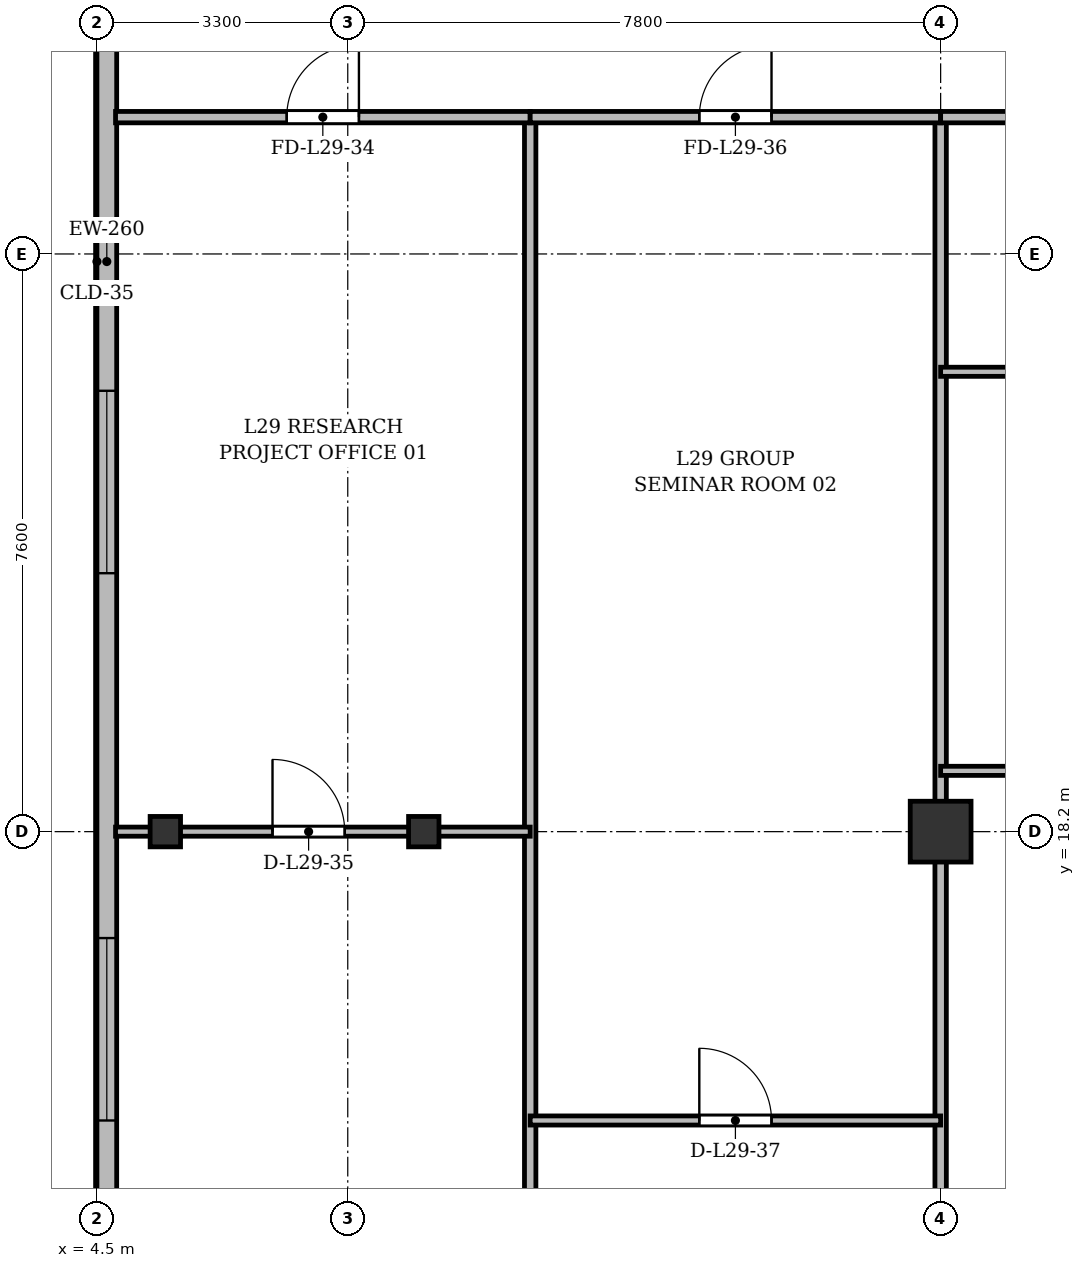
"""IFC4 building model, lengths in metres.
Left out: names, types, materials, properties, quantities, classifications, styles, units other than length and angle.
Written with IfcOpenShell. Run it as: python <this file> out.ifc"""

import sys

from ifc_helpers import new_model, si_unit, direction, frame, frame_2d, origin, origin_2d, place, context, subcontext, project, spatial, rectangle, i_section, extrude, source, transform, mapped, element, fill, save


model = new_model("IFC4")
c1 = context("Model", 3, precision=1e-05, world=origin(), true_north=direction((0.0, 1.0)))
c2 = subcontext(c1, "Body", "Model", "MODEL_VIEW")
j1 = project(units=[si_unit("LENGTHUNIT", "METRE"), si_unit("PLANEANGLEUNIT", "RADIAN")], contexts=[c1])
p1 = place(None, origin())
s1 = spatial("IfcSite", under=j1, at=p1, CompositionType="ELEMENT")
p2 = place(p1, origin())
s2 = spatial("IfcBuilding", under=s1, at=p2, CompositionType="ELEMENT")
p3 = place(p2, frame((0.0, 0.0, 114.1)))
s3 = spatial("IfcBuildingStorey", under=s2, at=p3, CompositionType="ELEMENT", Elevation=114.1)
m1 = source(origin(), c2, "Body", "SweptSolid", [
    extrude(i_section(OverallWidth=0.4, OverallDepth=0.4, WebThickness=0.022, FlangeThickness=0.035, at=origin_2d()), origin(), (0.0, 0.0, 1.0), 3.6),
])
for number, where, z_axis, x_axis in (
    (1, (5.4, 18.2, 0.0), (0.0, 0.0, 1.0), (1.0, 0.0, 0.0)),
    (2, (8.8, 18.2, 0.0), (0.0, 0.0, 1.0), (1.0, 0.0, 0.0)),
):
    element("IfcColumn", number, at=place(p3, frame(where, z_axis=z_axis, x_axis=x_axis)), inside=s3, PredefinedType="COLUMN", context=c2, shape_type="MappedRepresentation", body=[
        mapped(m1, transform((0.0, 0.0, 0.0), x_axis=(1.0, 0.0, 0.0), y_axis=(0.0, 1.0, 0.0), z_axis=(0.0, 0.0, 1.0), scale=1.0)),
    ])
m2 = source(origin(), c2, "Body", "SweptSolid", [
    extrude(rectangle(XDim=0.8, YDim=0.8, at=origin_2d()), origin(), (0.0, 0.0, 1.0), 3.6),
])
p4 = place(p3, frame((15.6, 18.2, 0.0), z_axis=(0.0, 0.0, 1.0), x_axis=(1.0, 0.0, 0.0)))
e3 = element("IfcColumn", 3, at=p4, inside=s3, PredefinedType="COLUMN", context=c2, shape_type="MappedRepresentation", body=[
    mapped(m2, transform((0.0, 0.0, 0.0), x_axis=(1.0, 0.0, 0.0), y_axis=(0.0, 1.0, 0.0), z_axis=(0.0, 0.0, 1.0), scale=1.0)),
])
p5 = place(p3, frame((4.63, 5.9, 0.0), z_axis=(0.0, 0.0, 1.0), x_axis=(0.0, 1.0, 0.0)))
e4 = element("IfcWall", 4, at=p5, inside=s3, PredefinedType="SOLIDWALL", context=c2, shape_type="SweptSolid", body=[
    extrude(rectangle(XDim=39.6, YDim=0.26, at=frame_2d((19.8, 0.0))), origin(), (0.0, 0.0, 1.0), 3.34),
])
p6 = place(p5, frame((1.45, 0.0, 0.92)))
e5 = element("IfcOpeningElement", 5, at=p6, cuts=e4, PredefinedType="OPENING", context=c2, shape_type="SweptSolid", body=[
    extrude(rectangle(XDim=1.2, YDim=1.65, at=frame_2d((0.6, 0.825))), frame((0.0, 0.14, 0.0), z_axis=(0.0, -1.0, 0.0), x_axis=(1.0, 0.0, 0.0)), (0.0, 0.0, 1.0), 0.28),
])
p7 = place(p5, frame((4.3, 0.0, 0.92)))
e6 = element("IfcOpeningElement", 6, at=p7, cuts=e4, PredefinedType="OPENING", context=c2, shape_type="SweptSolid", body=[
    extrude(rectangle(XDim=2.4, YDim=2.1, at=frame_2d((1.2, 1.05))), frame((0.0, 0.14, 0.0), z_axis=(0.0, -1.0, 0.0), x_axis=(1.0, 0.0, 0.0)), (0.0, 0.0, 1.0), 0.28),
])
p8 = place(p5, frame((8.5, 0.0, 0.92)))
e7 = element("IfcOpeningElement", 7, at=p8, cuts=e4, PredefinedType="OPENING", context=c2, shape_type="SweptSolid", body=[
    extrude(rectangle(XDim=2.4, YDim=2.1, at=frame_2d((1.2, 1.05))), frame((0.0, 0.14, 0.0), z_axis=(0.0, -1.0, 0.0), x_axis=(1.0, 0.0, 0.0)), (0.0, 0.0, 1.0), 0.28),
])
p9 = place(p5, frame((15.7, 0.0, 0.92)))
e8 = element("IfcOpeningElement", 8, at=p9, cuts=e4, PredefinedType="OPENING", context=c2, shape_type="SweptSolid", body=[
    extrude(rectangle(XDim=2.4, YDim=2.1, at=frame_2d((1.2, 1.05))), frame((0.0, 0.14, 0.0), z_axis=(0.0, -1.0, 0.0), x_axis=(1.0, 0.0, 0.0)), (0.0, 0.0, 1.0), 0.28),
])
p10 = place(p5, frame((33.9, 0.0, 0.92)))
e9 = element("IfcOpeningElement", 9, at=p10, cuts=e4, PredefinedType="OPENING", context=c2, shape_type="SweptSolid", body=[
    extrude(rectangle(XDim=1.2, YDim=1.65, at=frame_2d((0.6, 0.825))), frame((0.0, 0.14, 0.0), z_axis=(0.0, -1.0, 0.0), x_axis=(1.0, 0.0, 0.0)), (0.0, 0.0, 1.0), 0.28),
])
p11 = place(p5, frame((37.25, 0.0, 0.92)))
e10 = element("IfcOpeningElement", 10, at=p11, cuts=e4, PredefinedType="OPENING", context=c2, shape_type="SweptSolid", body=[
    extrude(rectangle(XDim=1.2, YDim=1.65, at=frame_2d((0.6, 0.825))), frame((0.0, 0.14, 0.0), z_axis=(0.0, -1.0, 0.0), x_axis=(1.0, 0.0, 0.0)), (0.0, 0.0, 1.0), 0.28),
])
p12 = place(p3, frame((10.2, 3.145, 0.0), z_axis=(0.0, 0.0, 1.0), x_axis=(0.0, 1.0, 0.0)))
e11 = element("IfcWall", 11, at=p12, inside=s3, PredefinedType="PARTITIONING", context=c2, shape_type="SweptSolid", body=[
    extrude(rectangle(XDim=24.455, YDim=0.15, at=frame_2d((12.228, 0.0))), origin(), (0.0, 0.0, 1.0), 2.752),
])
p13 = place(p3, frame((15.6, 3.145, 0.0), z_axis=(0.0, 0.0, 1.0), x_axis=(0.0, 1.0, 0.0)))
e12 = element("IfcWall", 12, at=p13, inside=s3, PredefinedType="PARTITIONING", context=c2, shape_type="SweptSolid", body=[
    extrude(rectangle(XDim=24.455, YDim=0.15, at=frame_2d((12.228, 0.0))), origin(), (0.0, 0.0, 1.0), 2.84),
])
p14 = place(p3, frame((4.745, 27.6, 0.0), z_axis=(0.0, 0.0, 1.0), x_axis=(1.0, 0.0, 0.0)))
e13 = element("IfcWall", 13, at=p14, inside=s3, PredefinedType="PARTITIONING", context=c2, shape_type="SweptSolid", body=[
    extrude(rectangle(XDim=5.455, YDim=0.15, at=frame_2d((2.728, 0.0))), origin(), (0.0, 0.0, 1.0), 2.84),
])
p15 = place(p14, frame((2.252, 0.0, 0.0)))
e14 = element("IfcOpeningElement", 14, at=p15, cuts=e13, PredefinedType="OPENING", context=c2, shape_type="SweptSolid", body=[
    extrude(rectangle(XDim=0.95, YDim=2.15, at=frame_2d((0.475, 1.075))), frame((0.0, 0.085, 0.0), z_axis=(0.0, -1.0, 0.0), x_axis=(1.0, 0.0, 0.0)), (0.0, 0.0, 1.0), 0.17),
])
p16 = place(p3, frame((4.745, 18.2, 0.0), z_axis=(0.0, 0.0, 1.0), x_axis=(1.0, 0.0, 0.0)))
e15 = element("IfcWall", 15, at=p16, inside=s3, PredefinedType="PARTITIONING", context=c2, shape_type="SweptSolid", body=[
    extrude(rectangle(XDim=5.455, YDim=0.12, at=frame_2d((2.728, 0.0))), origin(), (0.0, 0.0, 1.0), 2.752),
])
p17 = place(p16, frame((2.065, 0.0, 0.0)))
e16 = element("IfcOpeningElement", 16, at=p17, cuts=e15, PredefinedType="OPENING", context=c2, shape_type="SweptSolid", body=[
    extrude(rectangle(XDim=0.95, YDim=2.15, at=frame_2d((0.475, 1.075))), frame((0.0, 0.07, 0.0), z_axis=(0.0, -1.0, 0.0), x_axis=(1.0, 0.0, 0.0)), (0.0, 0.0, 1.0), 0.14),
])
p18 = place(p3, frame((10.2, 27.6, 0.0), z_axis=(0.0, 0.0, 1.0), x_axis=(1.0, 0.0, 0.0)))
e17 = element("IfcWall", 17, at=p18, inside=s3, PredefinedType="PARTITIONING", context=c2, shape_type="SweptSolid", body=[
    extrude(rectangle(XDim=5.4, YDim=0.15, at=frame_2d((2.7, 0.0))), origin(), (0.0, 0.0, 1.0), 2.84),
])
p19 = place(p18, frame((2.225, 0.0, 0.0)))
e18 = element("IfcOpeningElement", 18, at=p19, cuts=e17, PredefinedType="OPENING", context=c2, shape_type="SweptSolid", body=[
    extrude(rectangle(XDim=0.95, YDim=2.15, at=frame_2d((0.475, 1.075))), frame((0.0, 0.085, 0.0), z_axis=(0.0, -1.0, 0.0), x_axis=(1.0, 0.0, 0.0)), (0.0, 0.0, 1.0), 0.17),
])
p20 = place(p3, frame((10.2, 14.4, 0.0), z_axis=(0.0, 0.0, 1.0), x_axis=(1.0, 0.0, 0.0)))
e19 = element("IfcWall", 19, at=p20, inside=s3, PredefinedType="PARTITIONING", context=c2, shape_type="SweptSolid", body=[
    extrude(rectangle(XDim=5.4, YDim=0.12, at=frame_2d((2.7, 0.0))), origin(), (0.0, 0.0, 1.0), 2.84),
])
p21 = place(p20, frame((2.225, 0.0, 0.0)))
e20 = element("IfcOpeningElement", 20, at=p21, cuts=e19, PredefinedType="OPENING", context=c2, shape_type="SweptSolid", body=[
    extrude(rectangle(XDim=0.95, YDim=2.15, at=frame_2d((0.475, 1.075))), frame((0.0, 0.07, 0.0), z_axis=(0.0, -1.0, 0.0), x_axis=(1.0, 0.0, 0.0)), (0.0, 0.0, 1.0), 0.14),
])
p22 = place(p3, frame((15.6, 19.0, 0.0), z_axis=(0.0, 0.0, 1.0), x_axis=(1.0, 0.0, 0.0)))
e21 = element("IfcWall", 21, at=p22, inside=s3, PredefinedType="PARTITIONING", context=c2, shape_type="SweptSolid", body=[
    extrude(rectangle(XDim=6.2, YDim=0.12, at=frame_2d((3.1, 0.0))), origin(), (0.0, 0.0, 1.0), 2.84),
])
p23 = place(p22, frame((2.625, 0.0, 0.0)))
e22 = element("IfcOpeningElement", 22, at=p23, cuts=e21, PredefinedType="OPENING", context=c2, shape_type="SweptSolid", body=[
    extrude(rectangle(XDim=0.95, YDim=2.15, at=frame_2d((0.475, 1.075))), frame((0.0, 0.07, 0.0), z_axis=(0.0, -1.0, 0.0), x_axis=(1.0, 0.0, 0.0)), (0.0, 0.0, 1.0), 0.14),
])
p24 = place(p3, frame((15.6, 24.25, 0.0), z_axis=(0.0, 0.0, 1.0), x_axis=(1.0, 0.0, 0.0)))
e23 = element("IfcWall", 23, at=p24, inside=s3, PredefinedType="PARTITIONING", context=c2, shape_type="SweptSolid", body=[
    extrude(rectangle(XDim=2.158, YDim=0.12, at=frame_2d((1.079, 0.0))), origin(), (0.0, 0.0, 1.0), 2.84),
])
p25 = place(p3, frame((15.6, 27.6, 0.0), z_axis=(0.0, 0.0, 1.0), x_axis=(1.0, 0.0, 0.0)))
e24 = element("IfcWall", 24, at=p25, inside=s3, PredefinedType="PARTITIONING", context=c2, shape_type="SweptSolid", body=[
    extrude(rectangle(XDim=6.2, YDim=0.15, at=frame_2d((3.1, 0.0))), origin(), (0.0, 0.0, 1.0), 2.84),
])
p26 = place(p25, frame((4.086, 0.0, 0.0)))
e25 = element("IfcOpeningElement", 25, at=p26, cuts=e24, PredefinedType="OPENING", context=c2, shape_type="SweptSolid", body=[
    extrude(rectangle(XDim=0.95, YDim=2.15, at=frame_2d((0.475, 1.075))), frame((0.0, 0.085, 0.0), z_axis=(0.0, -1.0, 0.0), x_axis=(1.0, 0.0, 0.0)), (0.0, 0.0, 1.0), 0.17),
])
m3 = source(origin(), c2, "Body", "SweptSolid", [
    extrude(rectangle(XDim=2.4, YDim=2.1, at=frame_2d((1.2, 1.05))), frame((0.0, 0.03, 0.0), z_axis=(0.0, -1.0, 0.0), x_axis=(1.0, 0.0, 0.0)), (0.0, 0.0, 1.0), 0.06),
])
p27 = place(p8, origin())
e26 = element("IfcWindow", 26, at=p27, inside=s3, PartitioningType="SINGLE_PANEL", PredefinedType="WINDOW", context=c2, shape_type="MappedRepresentation", body=[
    mapped(m3, transform((0.0, 0.0, 0.0), x_axis=(1.0, 0.0, 0.0), y_axis=(0.0, 1.0, 0.0), z_axis=(0.0, 0.0, 1.0), scale=1.0)),
])
fill(e7, e26)
p28 = place(p9, origin())
e27 = element("IfcWindow", 27, at=p28, inside=s3, PartitioningType="SINGLE_PANEL", PredefinedType="WINDOW", context=c2, shape_type="MappedRepresentation", body=[
    mapped(m3, transform((0.0, 0.0, 0.0), x_axis=(1.0, 0.0, 0.0), y_axis=(0.0, 1.0, 0.0), z_axis=(0.0, 0.0, 1.0), scale=1.0)),
])
fill(e8, e27)
m4 = source(origin(), c2, "Body", "SweptSolid", [
    extrude(rectangle(XDim=0.95, YDim=2.15, at=frame_2d((0.475, 1.075))), frame((0.0, 0.025, 0.0), z_axis=(0.0, -1.0, 0.0), x_axis=(1.0, 0.0, 0.0)), (0.0, 0.0, 1.0), 0.05),
])
p29 = place(p15, origin())
e28 = element("IfcDoor", 28, at=p29, inside=s3, OperationType="SINGLE_SWING_RIGHT", PredefinedType="DOOR", context=c2, shape_type="MappedRepresentation", body=[
    mapped(m4, transform((0.0, 0.0, 0.0), x_axis=(1.0, 0.0, 0.0), y_axis=(0.0, 1.0, 0.0), z_axis=(0.0, 0.0, 1.0), scale=1.0)),
])
fill(e14, e28)
p30 = place(p17, origin())
e29 = element("IfcDoor", 29, at=p30, inside=s3, OperationType="SINGLE_SWING_LEFT", PredefinedType="DOOR", context=c2, shape_type="MappedRepresentation", body=[
    mapped(m4, transform((0.0, 0.0, 0.0), x_axis=(1.0, 0.0, 0.0), y_axis=(0.0, 1.0, 0.0), z_axis=(0.0, 0.0, 1.0), scale=1.0)),
])
fill(e16, e29)
p31 = place(p19, origin())
e30 = element("IfcDoor", 30, at=p31, inside=s3, OperationType="SINGLE_SWING_RIGHT", PredefinedType="DOOR", context=c2, shape_type="MappedRepresentation", body=[
    mapped(m4, transform((0.0, 0.0, 0.0), x_axis=(1.0, 0.0, 0.0), y_axis=(0.0, 1.0, 0.0), z_axis=(0.0, 0.0, 1.0), scale=1.0)),
])
fill(e18, e30)
p32 = place(p21, origin())
e31 = element("IfcDoor", 31, at=p32, inside=s3, OperationType="SINGLE_SWING_LEFT", PredefinedType="DOOR", context=c2, shape_type="MappedRepresentation", body=[
    mapped(m4, transform((0.0, 0.0, 0.0), x_axis=(1.0, 0.0, 0.0), y_axis=(0.0, 1.0, 0.0), z_axis=(0.0, 0.0, 1.0), scale=1.0)),
])
fill(e20, e31)
save(model, sys.argv[1])
